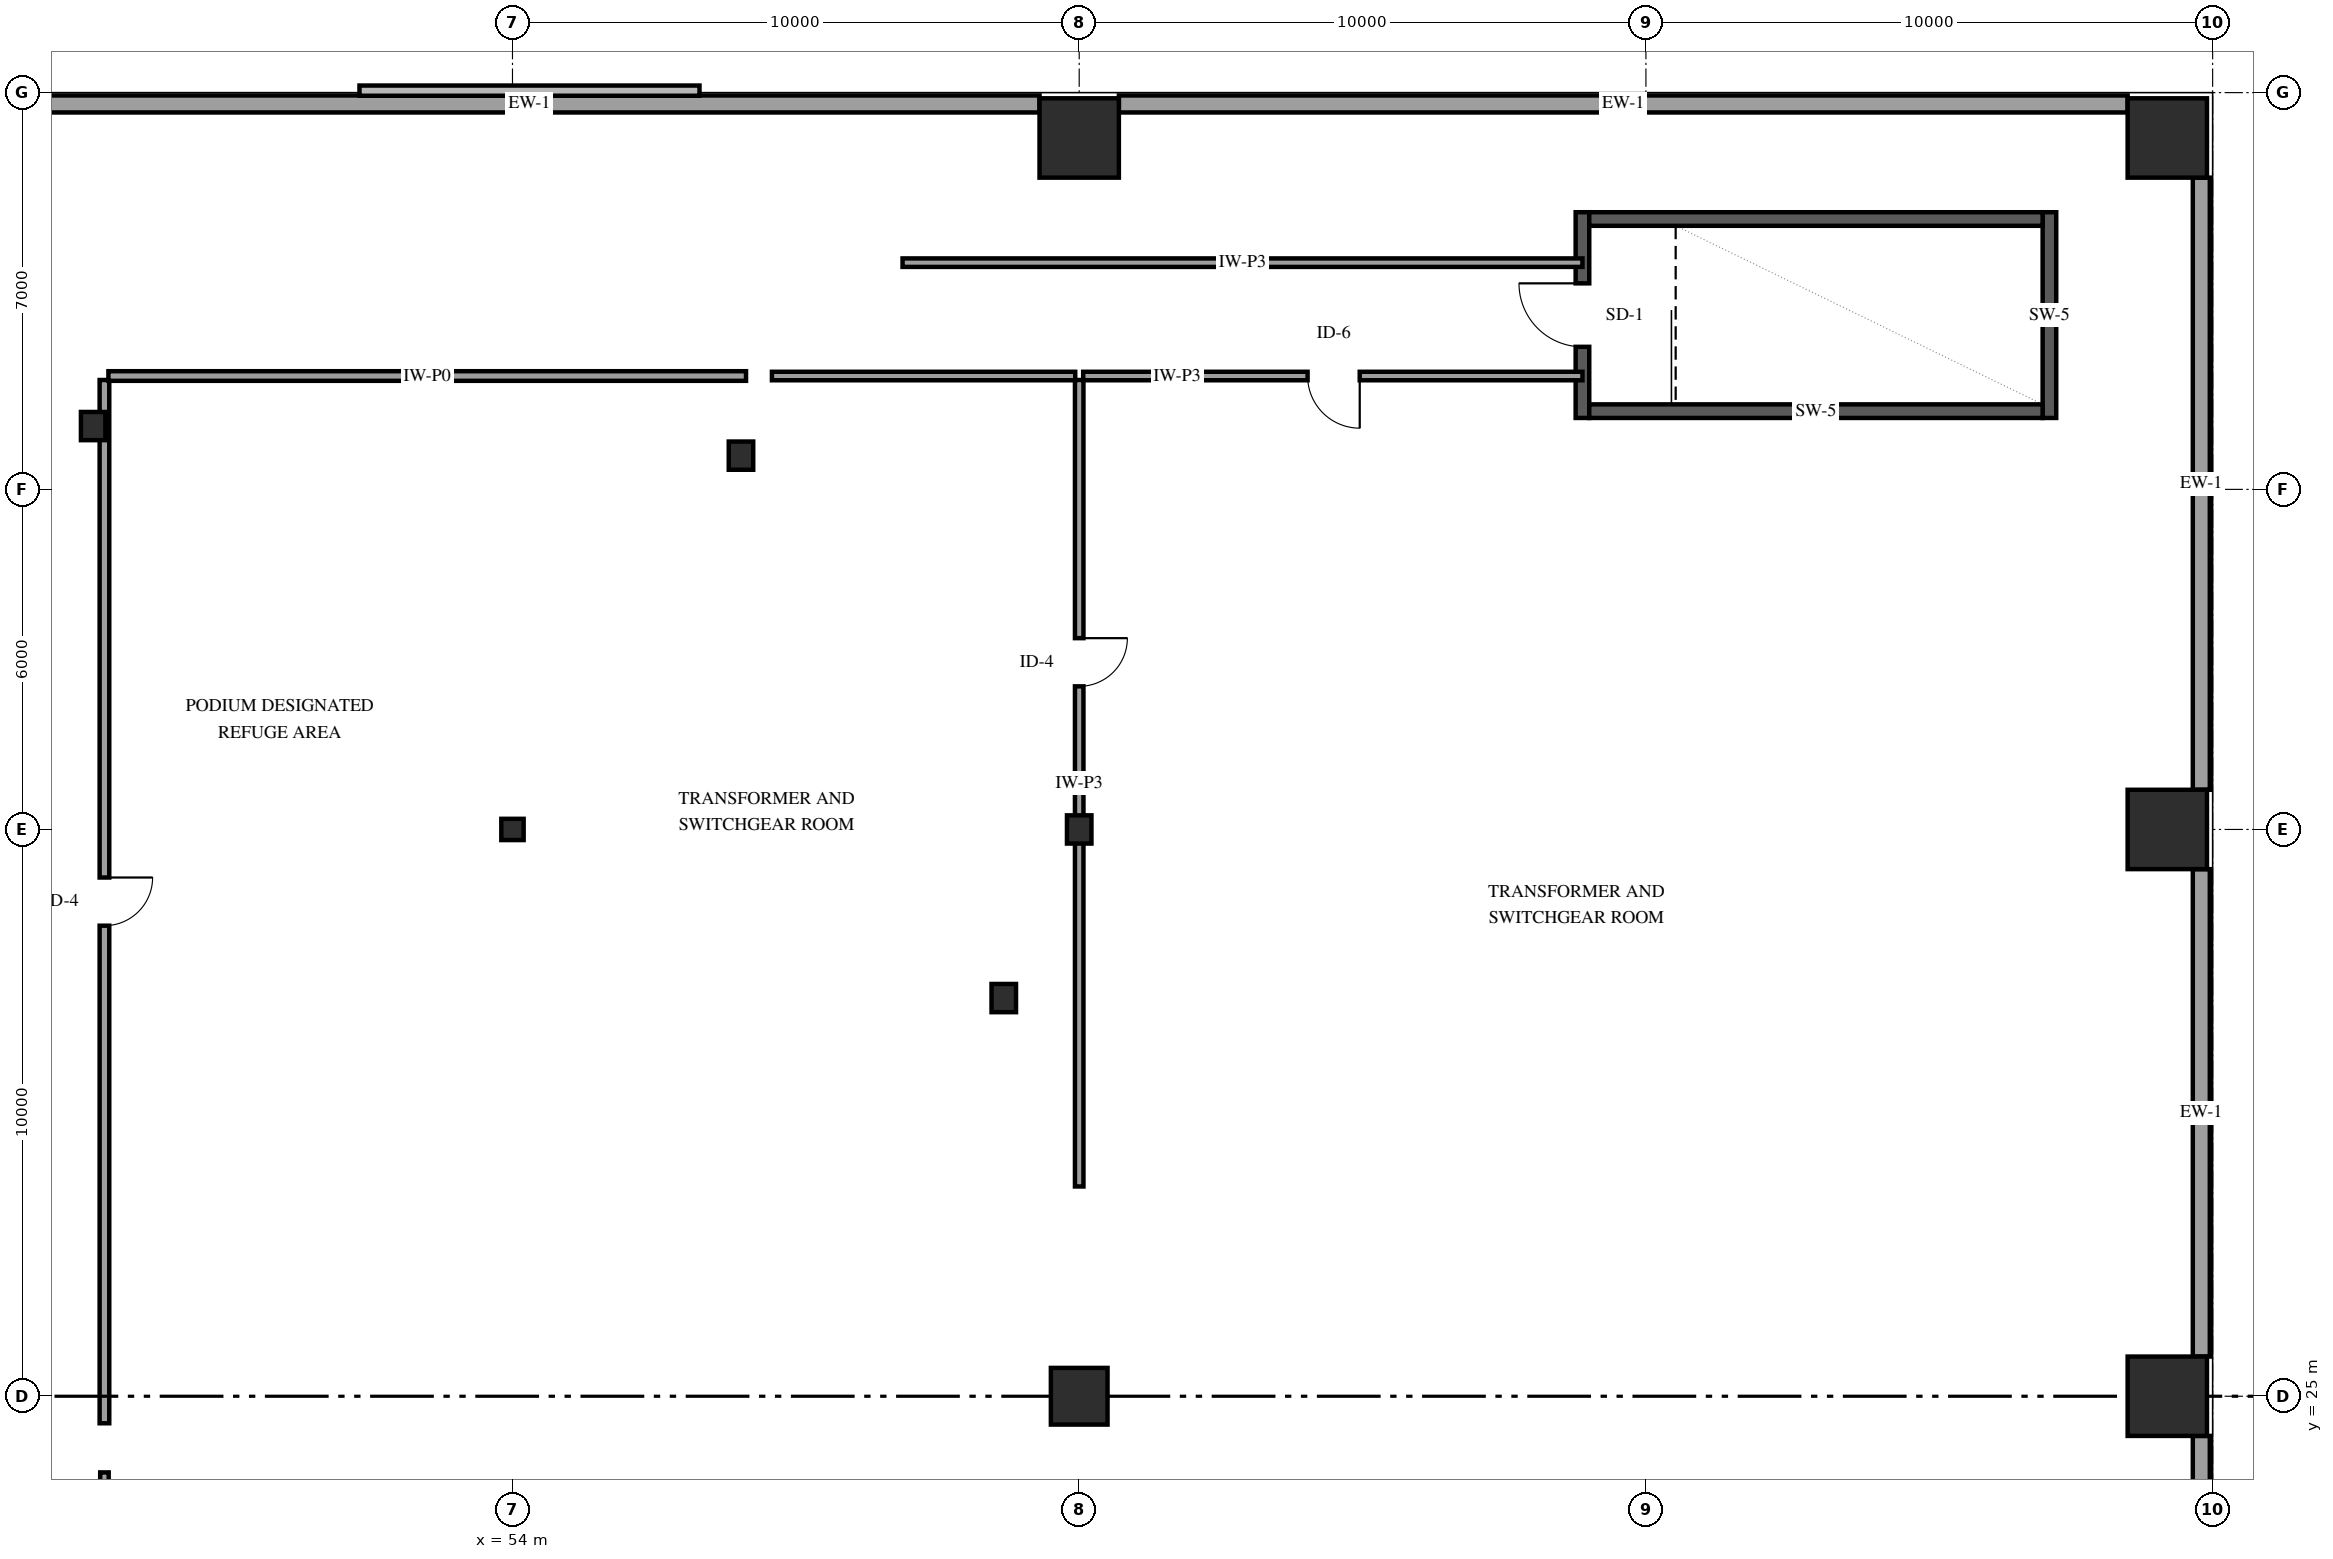
"""IFC4 building model, lengths in metres.
Left out: names, types, materials, properties, quantities, classifications, styles, units other than length and angle.
Written with IfcOpenShell. Run it as: python <this file> out.ifc"""

import sys

from ifc_helpers import new_model, si_unit, direction, frame, frame_2d, origin, origin_2d, place, context, subcontext, project, spatial, rectangle, i_section, extrude, element, fill, save


model = new_model("IFC4")
c1 = context("Model", 3, precision=1e-05, world=origin(), true_north=direction((0.0, 1.0)))
c2 = subcontext(c1, "Body", "Model", "MODEL_VIEW")
j1 = project(units=[si_unit("LENGTHUNIT", "METRE"), si_unit("PLANEANGLEUNIT", "RADIAN")], contexts=[c1])
p1 = place(None, origin())
s1 = spatial("IfcSite", under=j1, at=p1, CompositionType="ELEMENT")
p2 = place(p1, origin())
s2 = spatial("IfcBuilding", under=s1, at=p2, CompositionType="ELEMENT")
p3 = place(p2, frame((0.0, 0.0, 25.2)))
s3 = spatial("IfcBuildingStorey", under=s2, at=p3, CompositionType="ELEMENT", Elevation=25.2)
p4 = place(p3, frame((72.88, 42.26, 0.0), z_axis=(0.0, 0.0, 1.0), x_axis=(0.0, 1.0, 0.0)))
e1 = element("IfcWall", 1, at=p4, inside=s3, PredefinedType="SHEAR", context=c2, shape_type="SweptSolid", body=[
    extrude(rectangle(XDim=3.63, YDim=0.24, at=frame_2d((1.815, 0.0))), origin(), (0.0, 0.0, 1.0), 5.4),
])
p5 = place(p4, frame((1.255, 0.0, 0.0)))
e2 = element("IfcOpeningElement", 2, at=p5, cuts=e1, PredefinedType="OPENING", context=c2, shape_type="SweptSolid", body=[
    extrude(rectangle(XDim=1.12, YDim=2.15, at=frame_2d((0.56, 1.075))), frame((0.0, 0.13, 0.0), z_axis=(0.0, -1.0, 0.0), x_axis=(1.0, 0.0, 0.0)), (0.0, 0.0, 1.0), 0.26),
])
p6 = place(p3, frame((81.12, 42.26, 0.0), z_axis=(0.0, 0.0, 1.0), x_axis=(0.0, 1.0, 0.0)))
e3 = element("IfcWall", 3, at=p6, inside=s3, PredefinedType="SHEAR", context=c2, shape_type="SweptSolid", body=[
    extrude(rectangle(XDim=3.63, YDim=0.24, at=frame_2d((1.815, 0.0))), origin(), (0.0, 0.0, 1.0), 5.4),
])
for number, where, z_axis, x_axis in (
    (4, (73.0, 42.38, 0.0), (0.0, 0.0, 1.0), (1.0, 0.0, 0.0)),
    (5, (73.0, 45.77, 0.0), (0.0, 0.0, 1.0), (1.0, 0.0, 0.0)),
):
    element("IfcWall", number, at=place(p3, frame(where, z_axis=z_axis, x_axis=x_axis)), inside=s3, PredefinedType="SHEAR", context=c2, shape_type="SweptSolid", body=[
        extrude(rectangle(XDim=8.0, YDim=0.24, at=frame_2d((4.0, 0.0))), origin(), (0.0, 0.0, 1.0), 5.4),
    ])
p7 = place(p3, frame((64.0, 35.0, 0.0), z_axis=(0.0, 0.0, 1.0), x_axis=(1.0, 0.0, 0.0)))
e6 = element("IfcColumn", 6, at=p7, inside=s3, PredefinedType="COLUMN", context=c2, shape_type="SweptSolid", body=[
    extrude(i_section(OverallWidth=0.432, OverallDepth=0.498, WebThickness=0.056, FlangeThickness=0.089, FilletRadius=0.038, at=origin_2d()), origin(), (0.0, 0.0, 1.0), 5.1),
])
for number, where, z_axis, x_axis in (
    (7, (83.2, 35.0, 0.0), (0.0, 0.0, 1.0), (1.0, 0.0, 0.0)),
    (8, (64.0, 47.2, 0.0), (0.0, 0.0, 1.0), (1.0, 0.0, 0.0)),
    (9, (83.2, 47.2, 0.0), (0.0, 0.0, 1.0), (1.0, 0.0, 0.0)),
):
    element("IfcColumn", number, at=place(p3, frame(where, z_axis=z_axis, x_axis=x_axis)), inside=s3, PredefinedType="COLUMN", context=c2, shape_type="SweptSolid", body=[
        extrude(rectangle(XDim=1.4, YDim=1.4, at=origin_2d()), origin(), (0.0, 0.0, 1.0), 5.1),
    ])
p8 = place(p3, frame((64.0, 25.0, 0.0), z_axis=(0.0, 0.0, 1.0), x_axis=(1.0, 0.0, 0.0)))
e10 = element("IfcColumn", 10, at=p8, inside=s3, PredefinedType="COLUMN", context=c2, shape_type="SweptSolid", body=[
    extrude(rectangle(XDim=1.0, YDim=1.0, at=origin_2d()), origin(), (0.0, 0.0, 1.0), 5.1),
])
p9 = place(p3, frame((83.2, 25.0, 0.0), z_axis=(0.0, 0.0, 1.0), x_axis=(1.0, 0.0, 0.0)))
e11 = element("IfcColumn", 11, at=p9, inside=s3, PredefinedType="COLUMN", context=c2, shape_type="SweptSolid", body=[
    extrude(rectangle(XDim=1.4, YDim=1.4, at=origin_2d()), origin(), (0.0, 0.0, 1.0), 5.1),
])
p10 = place(p3, frame((54.0, 35.0, 0.0), z_axis=(0.0, 0.0, 1.0), x_axis=(1.0, 0.0, 0.0)))
e12 = element("IfcColumn", 12, at=p10, inside=s3, PredefinedType="COLUMN", context=c2, shape_type="SweptSolid", body=[
    extrude(i_section(OverallWidth=0.394, OverallDepth=0.375, WebThickness=0.017, FlangeThickness=0.028, FilletRadius=0.038, at=origin_2d()), origin(), (0.0, 0.0, 1.0), 5.1),
])
for number, where, z_axis, x_axis in (
    (13, (62.669, 32.025, 0.0), (0.0, 0.0, 1.0), (1.0, 0.0, 0.0)),
    (14, (58.032, 41.595, 0.0), (0.0, 0.0, 1.0), (1.0, 0.0, 0.0)),
    (15, (46.601, 42.117, 0.0), (0.0, 0.0, 1.0), (1.0, 0.0, 0.0)),
):
    element("IfcColumn", number, at=place(p3, frame(where, z_axis=z_axis, x_axis=x_axis)), inside=s3, PredefinedType="COLUMN", context=c2, shape_type="SweptSolid", body=[
        extrude(i_section(OverallWidth=0.432, OverallDepth=0.498, WebThickness=0.056, FlangeThickness=0.089, FilletRadius=0.038, at=origin_2d()), origin(), (0.0, 0.0, 1.0), 5.1),
    ])
p11 = place(p3, frame((45.3, 47.8, 0.0), z_axis=(0.0, 0.0, 1.0), x_axis=(1.0, 0.0, 0.0)))
e16 = element("IfcWall", 16, at=p11, inside=s3, PredefinedType="SOLIDWALL", context=c2, shape_type="SweptSolid", body=[
    extrude(rectangle(XDim=18.0, YDim=0.3, at=frame_2d((9.0, 0.0))), origin(), (0.0, 0.0, 1.0), 4.156),
])
p12 = place(p3, frame((64.7, 47.8, 0.0), z_axis=(0.0, 0.0, 1.0), x_axis=(1.0, 0.0, 0.0)))
e17 = element("IfcWall", 17, at=p12, inside=s3, PredefinedType="SOLIDWALL", context=c2, shape_type="SweptSolid", body=[
    extrude(rectangle(XDim=17.8, YDim=0.3, at=frame_2d((8.9, 0.0))), origin(), (0.0, 0.0, 1.0), 4.156),
])
for number, where, z_axis, x_axis in (
    (18, (83.8, 24.3, 0.0), (0.0, 0.0, 1.0), (0.0, -1.0, 0.0)),
    (19, (83.8, 34.3, 0.0), (0.0, 0.0, 1.0), (0.0, -1.0, 0.0)),
):
    element("IfcWall", number, at=place(p3, frame(where, z_axis=z_axis, x_axis=x_axis)), inside=s3, PredefinedType="SOLIDWALL", context=c2, shape_type="SweptSolid", body=[
        extrude(rectangle(XDim=8.6, YDim=0.3, at=frame_2d((4.3, 0.0))), origin(), (0.0, 0.0, 1.0), 4.156),
    ])
p13 = place(p3, frame((83.8, 46.5, 0.0), z_axis=(0.0, 0.0, 1.0), x_axis=(0.0, -1.0, 0.0)))
e20 = element("IfcWall", 20, at=p13, inside=s3, PredefinedType="SOLIDWALL", context=c2, shape_type="SweptSolid", body=[
    extrude(rectangle(XDim=10.8, YDim=0.3, at=frame_2d((5.4, 0.0))), origin(), (0.0, 0.0, 1.0), 4.156),
])
p14 = place(p3, frame((72.88, 43.0, 0.0), z_axis=(0.0, 0.0, 1.0), x_axis=(-1.0, 0.0, 0.0)))
e21 = element("IfcWall", 21, at=p14, inside=s3, PredefinedType="PARTITIONING", context=c2, shape_type="SweptSolid", body=[
    extrude(rectangle(XDim=8.81, YDim=0.15, at=frame_2d((4.405, 0.0))), origin(), (0.0, 0.0, 1.0), 5.1),
])
p15 = place(p14, frame((3.93, 0.0, 0.0)))
e22 = element("IfcOpeningElement", 22, at=p15, cuts=e21, PredefinedType="OPENING", context=c2, shape_type="SweptSolid", body=[
    extrude(rectangle(XDim=0.92, YDim=2.12, at=frame_2d((0.46, 1.06))), frame((0.0, 0.085, 0.0), z_axis=(0.0, -1.0, 0.0), x_axis=(1.0, 0.0, 0.0)), (0.0, 0.0, 1.0), 0.17),
])
p16 = place(p3, frame((46.8, 42.93, 0.0), z_axis=(0.0, 0.0, 1.0), x_axis=(0.0, -1.0, 0.0)))
e23 = element("IfcWall", 23, at=p16, inside=s3, PredefinedType="PARTITIONING", context=c2, shape_type="SweptSolid", body=[
    extrude(rectangle(XDim=18.407, YDim=0.17, at=frame_2d((9.204, 0.0))), origin(), (0.0, 0.0, 1.0), 5.1),
])
p17 = place(p16, frame((8.778, 0.0, 0.0)))
e24 = element("IfcOpeningElement", 24, at=p17, cuts=e23, PredefinedType="OPENING", context=c2, shape_type="SweptSolid", body=[
    extrude(rectangle(XDim=0.85, YDim=2.1, at=frame_2d((0.425, 1.05))), frame((0.0, 0.095, 0.0), z_axis=(0.0, -1.0, 0.0), x_axis=(1.0, 0.0, 0.0)), (0.0, 0.0, 1.0), 0.19),
])
p18 = place(p3, frame((64.0, 42.93, 0.0), z_axis=(0.0, 0.0, 1.0), x_axis=(0.0, -1.0, 0.0)))
e25 = element("IfcWall", 25, at=p18, inside=s3, PredefinedType="PARTITIONING", context=c2, shape_type="SweptSolid", body=[
    extrude(rectangle(XDim=14.229, YDim=0.15, at=frame_2d((7.115, 0.0))), origin(), (0.0, 0.0, 1.0), 4.222),
])
p19 = place(p18, frame((4.555, 0.0, 0.0)))
e26 = element("IfcOpeningElement", 26, at=p19, cuts=e25, PredefinedType="OPENING", context=c2, shape_type="SweptSolid", body=[
    extrude(rectangle(XDim=0.85, YDim=2.1, at=frame_2d((0.425, 1.05))), frame((0.0, 0.085, 0.0), z_axis=(0.0, -1.0, 0.0), x_axis=(1.0, 0.0, 0.0)), (0.0, 0.0, 1.0), 0.17),
])
p20 = place(p3, frame((60.883, 45.0, 0.0), z_axis=(0.0, 0.0, 1.0), x_axis=(1.0, 0.0, 0.0)))
e27 = element("IfcWall", 27, at=p20, inside=s3, PredefinedType="PARTITIONING", context=c2, shape_type="SweptSolid", body=[
    extrude(rectangle(XDim=11.997, YDim=0.15, at=frame_2d((5.999, 0.0))), origin(), (0.0, 0.0, 1.0), 5.1),
])
p21 = place(p3, frame((46.8, 23.656, 0.0), z_axis=(0.0, 0.0, 1.0), x_axis=(0.0, -1.0, 0.0)))
e28 = element("IfcWall", 28, at=p21, inside=s3, PredefinedType="PARTITIONING", context=c2, shape_type="SweptSolid", body=[
    extrude(rectangle(XDim=11.786, YDim=0.15, at=frame_2d((5.893, 0.0))), origin(), (0.0, 0.0, 1.0), 5.1),
])
p22 = place(p3, frame((58.121, 43.0, 0.0), z_axis=(0.0, 0.0, 1.0), x_axis=(-1.0, 0.0, 0.0)))
e29 = element("IfcWall", 29, at=p22, inside=s3, PredefinedType="PARTITIONING", context=c2, shape_type="SweptSolid", body=[
    extrude(rectangle(XDim=11.251, YDim=0.17, at=frame_2d((5.625, 0.0))), origin(), (0.0, 0.0, 1.0), 5.1),
])
p23 = place(p3, frame((63.93, 43.0, 0.0), z_axis=(0.0, 0.0, 1.0), x_axis=(-1.0, 0.0, 0.0)))
e30 = element("IfcWall", 30, at=p23, inside=s3, PredefinedType="PARTITIONING", context=c2, shape_type="SweptSolid", body=[
    extrude(rectangle(XDim=5.352, YDim=0.15, at=frame_2d((2.676, 0.0))), origin(), (0.0, 0.0, 1.0), 5.1),
])
p24 = place(p5, origin())
e31 = element("IfcDoor", 31, at=p24, inside=s3, OperationType="SINGLE_SWING_RIGHT", PredefinedType="DOOR", context=c2, shape_type="SweptSolid", body=[
    extrude(rectangle(XDim=1.12, YDim=2.15, at=frame_2d((0.56, 1.075))), frame((0.0, 0.025, 0.0), z_axis=(0.0, -1.0, 0.0), x_axis=(1.0, 0.0, 0.0)), (0.0, 0.0, 1.0), 0.05),
])
fill(e2, e31)
p25 = place(p15, origin())
e32 = element("IfcDoor", 32, at=p25, inside=s3, OperationType="SINGLE_SWING_LEFT", PredefinedType="DOOR", context=c2, shape_type="SweptSolid", body=[
    extrude(rectangle(XDim=0.92, YDim=2.12, at=frame_2d((0.46, 1.06))), frame((0.0, 0.025, 0.0), z_axis=(0.0, -1.0, 0.0), x_axis=(1.0, 0.0, 0.0)), (0.0, 0.0, 1.0), 0.05),
])
fill(e22, e32)
p26 = place(p17, origin())
e33 = element("IfcDoor", 33, at=p26, inside=s3, OperationType="SINGLE_SWING_LEFT", PredefinedType="DOOR", context=c2, shape_type="SweptSolid", body=[
    extrude(rectangle(XDim=0.85, YDim=2.1, at=frame_2d((0.425, 1.05))), frame((0.0, 0.025, 0.0), z_axis=(0.0, -1.0, 0.0), x_axis=(1.0, 0.0, 0.0)), (0.0, 0.0, 1.0), 0.05),
])
fill(e24, e33)
p27 = place(p19, origin())
e34 = element("IfcDoor", 34, at=p27, inside=s3, OperationType="SINGLE_SWING_LEFT", PredefinedType="DOOR", context=c2, shape_type="SweptSolid", body=[
    extrude(rectangle(XDim=0.85, YDim=2.1, at=frame_2d((0.425, 1.05))), frame((0.0, 0.025, 0.0), z_axis=(0.0, -1.0, 0.0), x_axis=(1.0, 0.0, 0.0)), (0.0, 0.0, 1.0), 0.05),
])
fill(e26, e34)
save(model, sys.argv[1])
